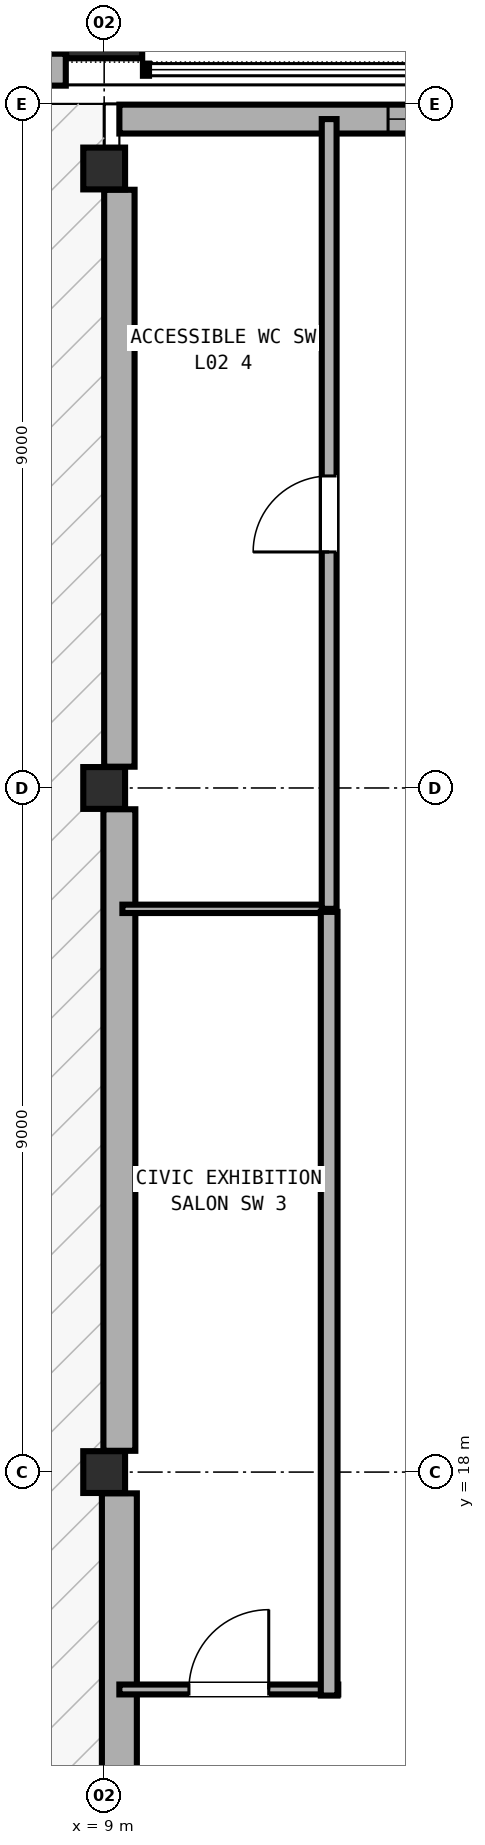
"""IFC4 building model, lengths in metres.
Left out: names, types, materials, properties, quantities, classifications, styles, units other than length and angle.
Written with IfcOpenShell. Run it as: python <this file> out.ifc"""

import sys

from ifc_helpers import new_model, si_unit, direction, frame, frame_2d, origin, origin_2d, place, context, subcontext, project, spatial, rectangle, extrude, element, fill, save


model = new_model("IFC4")
c1 = context("Model", 3, precision=1e-05, world=origin(), true_north=direction((0.0, 1.0)))
c2 = subcontext(c1, "Body", "Model", "MODEL_VIEW")
j1 = project(units=[si_unit("LENGTHUNIT", "METRE"), si_unit("PLANEANGLEUNIT", "RADIAN")], contexts=[c1])
p1 = place(None, origin())
s1 = spatial("IfcSite", under=j1, at=p1, CompositionType="ELEMENT")
p2 = place(p1, origin())
s2 = spatial("IfcBuilding", under=s1, at=p2, CompositionType="ELEMENT")
p3 = place(p2, frame((0.0, 0.0, 9.6)))
s3 = spatial("IfcBuildingStorey", under=s2, at=p3, CompositionType="ELEMENT", Elevation=9.6)
p4 = place(p3, frame((9.0, 37.1, 0.0), z_axis=(0.0, 0.0, 1.0), x_axis=(1.0, 0.0, 0.0)))
e1 = element("IfcColumn", 1, at=p4, inside=s3, PredefinedType="COLUMN", context=c2, shape_type="SweptSolid", body=[
    extrude(rectangle(XDim=1.0, YDim=1.0, at=origin_2d()), origin(), (0.0, 0.0, 1.0), 4.8),
])
for number, where, z_axis, x_axis in (
    (2, (9.0, 18.0, 0.0), (0.0, 0.0, 1.0), (1.0, 0.0, 0.0)),
    (3, (9.0, 27.0, 0.0), (0.0, 0.0, 1.0), (1.0, 0.0, 0.0)),
    (4, (9.0, 35.15, 0.0), (0.0, 0.0, 1.0), (1.0, 0.0, 0.0)),
):
    element("IfcColumn", number, at=place(p3, frame(where, z_axis=z_axis, x_axis=x_axis)), inside=s3, PredefinedType="COLUMN", context=c2, shape_type="SweptSolid", body=[
        extrude(rectangle(XDim=0.55, YDim=0.55, at=origin_2d()), origin(), (0.0, 0.0, 1.0), 4.8),
    ])
p5 = place(p3, frame((8.495, 36.45, 0.0), z_axis=(0.0, 0.0, 1.0), x_axis=(-1.0, 0.0, 0.0)))
e5 = element("IfcWall", 5, at=p5, inside=s3, PredefinedType="SOLIDWALL", context=c2, shape_type="SweptSolid", body=[
    extrude(rectangle(XDim=7.99, YDim=0.42, at=frame_2d((3.995, 0.0))), origin(), (0.0, 0.0, 1.0), 3.58),
])
p6 = place(p5, frame((3.17, 0.0, 0.0)))
e6 = element("IfcOpeningElement", 6, at=p6, cuts=e5, PredefinedType="OPENING", context=c2, shape_type="SweptSolid", body=[
    extrude(rectangle(XDim=1.65, YDim=2.2, at=frame_2d((0.825, 1.1))), frame((0.0, 0.22, 0.0), z_axis=(0.0, -1.0, 0.0), x_axis=(1.0, 0.0, 0.0)), (0.0, 0.0, 1.0), 0.44),
])
p7 = place(p3, frame((9.2, 9.28, 0.0), z_axis=(0.0, 0.0, 1.0), x_axis=(0.0, 1.0, 0.0)))
e7 = element("IfcWall", 7, at=p7, inside=s3, PredefinedType="SOLIDWALL", context=c2, shape_type="SweptSolid", body=[
    extrude(rectangle(XDim=8.44, YDim=0.46, at=frame_2d((4.22, 0.0))), origin(), (0.0, 0.0, 1.0), 3.58),
])
p8 = place(p3, frame((9.2, 18.28, 0.0), z_axis=(0.0, 0.0, 1.0), x_axis=(0.0, 1.0, 0.0)))
e8 = element("IfcWall", 8, at=p8, inside=s3, PredefinedType="SOLIDWALL", context=c2, shape_type="SweptSolid", body=[
    extrude(rectangle(XDim=8.44, YDim=0.42, at=frame_2d((4.22, 0.0))), origin(), (0.0, 0.0, 1.0), 3.58),
])
p9 = place(p3, frame((9.2, 27.28, 0.0), z_axis=(0.0, 0.0, 1.0), x_axis=(0.0, 1.0, 0.0)))
e9 = element("IfcWall", 9, at=p9, inside=s3, PredefinedType="SOLIDWALL", context=c2, shape_type="SweptSolid", body=[
    extrude(rectangle(XDim=7.59, YDim=0.4, at=frame_2d((3.795, 0.0))), origin(), (0.0, 0.0, 1.0), 3.58),
])
p10 = place(p3, frame((9.2, 35.8, 0.0), z_axis=(0.0, 0.0, 1.0), x_axis=(1.0, 0.0, 0.0)))
e10 = element("IfcWall", 10, at=p10, inside=s3, PredefinedType="SOLIDWALL", context=c2, shape_type="SweptSolid", body=[
    extrude(rectangle(XDim=8.92, YDim=0.38, at=frame_2d((4.46, 0.0))), origin(), (0.0, 0.0, 1.0), 3.58),
])
p11 = place(p10, frame((3.535, 0.0, 0.9)))
e11 = element("IfcOpeningElement", 11, at=p11, cuts=e10, PredefinedType="OPENING", context=c2, shape_type="SweptSolid", body=[
    extrude(rectangle(XDim=1.85, YDim=1.95, at=frame_2d((0.925, 0.975))), frame((0.0, 0.2, 0.0), z_axis=(0.0, -1.0, 0.0), x_axis=(1.0, 0.0, 0.0)), (0.0, 0.0, 1.0), 0.4),
])
p12 = place(p3, frame((9.2, 15.14, 0.0), z_axis=(0.0, 0.0, 1.0), x_axis=(1.0, 0.0, 0.0)))
e12 = element("IfcWall", 12, at=p12, inside=s3, PredefinedType="PARTITIONING", context=c2, shape_type="SweptSolid", body=[
    extrude(rectangle(XDim=2.88, YDim=0.13, at=frame_2d((1.44, 0.0))), origin(), (0.0, 0.0, 1.0), 3.56),
])
p13 = place(p12, frame((0.915, 0.0, 0.0)))
e13 = element("IfcOpeningElement", 13, at=p13, cuts=e12, PredefinedType="OPENING", context=c2, shape_type="SweptSolid", body=[
    extrude(rectangle(XDim=1.05, YDim=2.1, at=frame_2d((0.525, 1.05))), frame((0.0, 0.075, 0.0), z_axis=(0.0, -1.0, 0.0), x_axis=(1.0, 0.0, 0.0)), (0.0, 0.0, 1.0), 0.15),
])
p14 = place(p3, frame((9.24, 25.41, 0.0), z_axis=(0.0, 0.0, 1.0), x_axis=(1.0, 0.0, 0.0)))
e14 = element("IfcWall", 14, at=p14, inside=s3, PredefinedType="PARTITIONING", context=c2, shape_type="SweptSolid", body=[
    extrude(rectangle(XDim=2.8, YDim=0.11, at=frame_2d((1.4, 0.0))), origin(), (0.0, 0.0, 1.0), 3.56),
])
p15 = place(p3, frame((11.96, 25.37, 0.0), z_axis=(0.0, 0.0, 1.0), x_axis=(0.0, -1.0, 0.0)))
e15 = element("IfcWall", 15, at=p15, inside=s3, PredefinedType="PARTITIONING", context=c2, shape_type="SweptSolid", body=[
    extrude(rectangle(XDim=10.31, YDim=0.22, at=frame_2d((5.155, 0.0))), origin(), (0.0, 0.0, 1.0), 3.56),
])
p16 = place(p3, frame((11.96, 25.41, 0.0), z_axis=(0.0, 0.0, 1.0), x_axis=(0.0, 1.0, 0.0)))
e16 = element("IfcWall", 16, at=p16, inside=s3, PredefinedType="PARTITIONING", context=c2, shape_type="SweptSolid", body=[
    extrude(rectangle(XDim=10.39, YDim=0.195, at=frame_2d((5.195, 0.0))), origin(), (0.0, 0.0, 1.0), 3.56),
])
p17 = place(p16, frame((4.695, 0.0, 0.0)))
e17 = element("IfcOpeningElement", 17, at=p17, cuts=e16, PredefinedType="OPENING", context=c2, shape_type="SweptSolid", body=[
    extrude(rectangle(XDim=1.0, YDim=2.1, at=frame_2d((0.5, 1.05))), frame((0.0, 0.107, 0.0), z_axis=(0.0, -1.0, 0.0), x_axis=(1.0, 0.0, 0.0)), (0.0, 0.0, 1.0), 0.215),
])
p18 = place(p11, origin())
e18 = element("IfcWindow", 18, at=p18, inside=s3, PartitioningType="DOUBLE_PANEL_VERTICAL", PredefinedType="WINDOW", context=c2, shape_type="SweptSolid", body=[
    extrude(rectangle(XDim=1.85, YDim=1.95, at=frame_2d((0.925, 0.975))), frame((0.0, 0.03, 0.0), z_axis=(0.0, -1.0, 0.0), x_axis=(1.0, 0.0, 0.0)), (0.0, 0.0, 1.0), 0.06),
])
fill(e11, e18)
p19 = place(p13, origin())
e19 = element("IfcDoor", 19, at=p19, inside=s3, OperationType="SINGLE_SWING_RIGHT", PredefinedType="DOOR", context=c2, shape_type="SweptSolid", body=[
    extrude(rectangle(XDim=1.05, YDim=2.1, at=frame_2d((0.525, 1.05))), frame((0.0, 0.025, 0.0), z_axis=(0.0, -1.0, 0.0), x_axis=(1.0, 0.0, 0.0)), (0.0, 0.0, 1.0), 0.05),
])
fill(e13, e19)
p20 = place(p17, origin())
e20 = element("IfcDoor", 20, at=p20, inside=s3, OperationType="SINGLE_SWING_LEFT", PredefinedType="DOOR", context=c2, shape_type="SweptSolid", body=[
    extrude(rectangle(XDim=1.0, YDim=2.1, at=frame_2d((0.5, 1.05))), frame((0.0, 0.025, 0.0), z_axis=(0.0, -1.0, 0.0), x_axis=(1.0, 0.0, 0.0)), (0.0, 0.0, 1.0), 0.05),
])
fill(e17, e20)
save(model, sys.argv[1])
